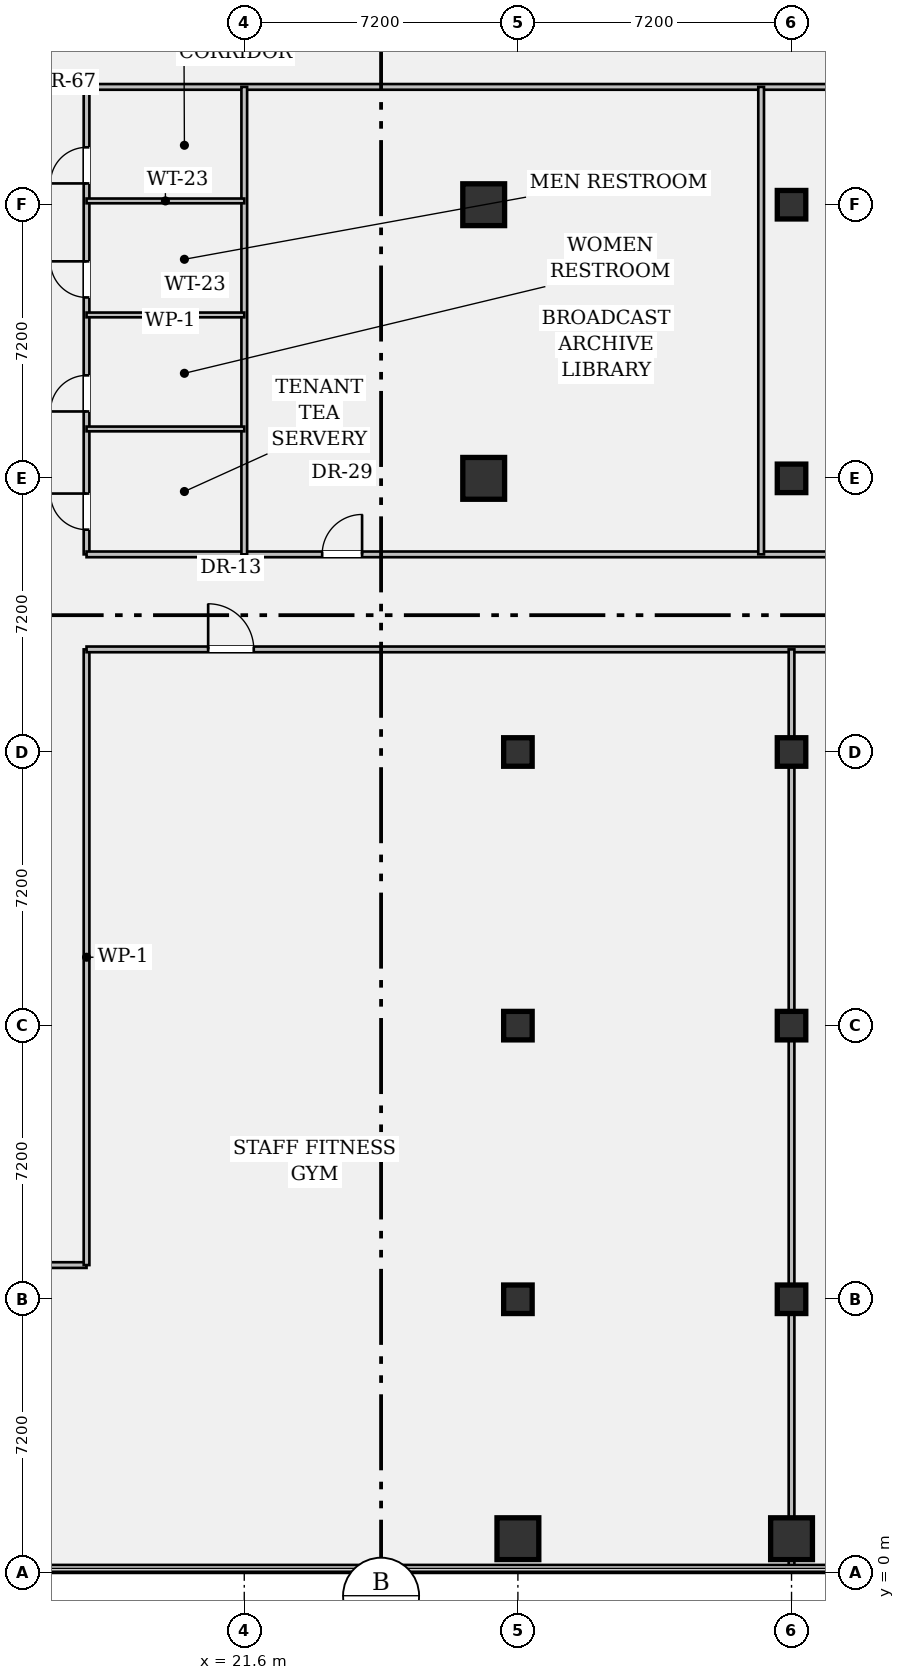
"""IFC4 building model, lengths in metres.
Left out: names, types, materials, properties, quantities, classifications, styles, units other than length and angle.
Written with IfcOpenShell. Run it as: python <this file> out.ifc"""

import sys

from ifc_helpers import new_model, si_unit, direction, frame, frame_2d, origin, origin_2d, place, context, subcontext, project, spatial, rectangle, hollow_rectangle, extrude, element, fill, save


model = new_model("IFC4")
c1 = context("Model", 3, precision=1e-05, world=origin(), true_north=direction((0.0, 1.0)))
c2 = subcontext(c1, "Body", "Model", "MODEL_VIEW")
j1 = project(units=[si_unit("LENGTHUNIT", "METRE"), si_unit("PLANEANGLEUNIT", "RADIAN")], contexts=[c1])
p1 = place(None, origin())
s1 = spatial("IfcSite", under=j1, at=p1, CompositionType="ELEMENT")
p2 = place(p1, origin())
s2 = spatial("IfcBuilding", under=s1, at=p2, CompositionType="ELEMENT")
p3 = place(p2, frame((0.0, 0.0, 22.05)))
s3 = spatial("IfcBuildingStorey", under=s2, at=p3, CompositionType="ELEMENT", Elevation=22.05)
for number, where, z_axis, x_axis in (
    (1, (27.9, 28.8, 0.0), (0.0, 0.0, 1.0), (1.0, 0.0, 0.0)),
    (2, (27.9, 36.0, 0.0), (0.0, 0.0, 1.0), (1.0, 0.0, 0.0)),
    (3, (28.8, 0.9, 0.0), (0.0, 0.0, 1.0), (1.0, 0.0, 0.0)),
):
    element("IfcColumn", number, at=place(p3, frame(where, z_axis=z_axis, x_axis=x_axis)), inside=s3, PredefinedType="COLUMN", context=c2, shape_type="SweptSolid", body=[
        extrude(hollow_rectangle(XDim=1.1, YDim=1.1, WallThickness=0.07, at=origin_2d()), origin(), (0.0, 0.0, 1.0), 3.9),
    ])
for number, where, z_axis, x_axis in (
    (4, (28.8, 7.2, 0.0), (0.0, 0.0, 1.0), (1.0, 0.0, 0.0)),
    (5, (28.8, 14.4, 0.0), (0.0, 0.0, 1.0), (1.0, 0.0, 0.0)),
    (6, (28.8, 21.6, 0.0), (0.0, 0.0, 1.0), (1.0, 0.0, 0.0)),
):
    element("IfcColumn", number, at=place(p3, frame(where, z_axis=z_axis, x_axis=x_axis)), inside=s3, PredefinedType="COLUMN", context=c2, shape_type="SweptSolid", body=[
        extrude(rectangle(XDim=0.75, YDim=0.75, at=origin_2d()), origin(), (0.0, 0.0, 1.0), 3.9),
    ])
p4 = place(p3, frame((36.0, 0.9, 0.0), z_axis=(0.0, 0.0, 1.0), x_axis=(1.0, 0.0, 0.0)))
e7 = element("IfcColumn", 7, at=p4, inside=s3, PredefinedType="COLUMN", context=c2, shape_type="SweptSolid", body=[
    extrude(hollow_rectangle(XDim=1.1, YDim=1.1, WallThickness=0.07, at=origin_2d()), origin(), (0.0, 0.0, 1.0), 3.9),
])
for number, where, z_axis, x_axis in (
    (8, (36.0, 7.2, 0.0), (0.0, 0.0, 1.0), (1.0, 0.0, 0.0)),
    (9, (36.0, 14.4, 0.0), (0.0, 0.0, 1.0), (1.0, 0.0, 0.0)),
    (10, (36.0, 21.6, 0.0), (0.0, 0.0, 1.0), (1.0, 0.0, 0.0)),
    (11, (36.0, 28.8, 0.0), (0.0, 0.0, 1.0), (1.0, 0.0, 0.0)),
    (12, (36.0, 36.0, 0.0), (0.0, 0.0, 1.0), (1.0, 0.0, 0.0)),
):
    element("IfcColumn", number, at=place(p3, frame(where, z_axis=z_axis, x_axis=x_axis)), inside=s3, PredefinedType="COLUMN", context=c2, shape_type="SweptSolid", body=[
        extrude(rectangle(XDim=0.75, YDim=0.75, at=origin_2d()), origin(), (0.0, 0.0, 1.0), 3.9),
    ])
p5 = place(p3, frame((14.4, 8.1, 0.0), z_axis=(0.0, 0.0, 1.0), x_axis=(1.0, 0.0, 0.0)))
e13 = element("IfcWall", 13, at=p5, inside=s3, PredefinedType="PARTITIONING", context=c2, shape_type="SweptSolid", body=[
    extrude(rectangle(XDim=3.05, YDim=0.15, at=frame_2d((1.525, 0.0))), origin(), (0.0, 0.0, 1.0), 2.958),
])
p6 = place(p5, frame((0.9, 0.0, 0.0)))
e14 = element("IfcOpeningElement", 14, at=p6, cuts=e13, PredefinedType="OPENING", context=c2, shape_type="SweptSolid", body=[
    extrude(rectangle(XDim=1.0, YDim=2.15, at=frame_2d((0.5, 1.075))), frame((0.0, 0.087, 0.0), z_axis=(0.0, -1.0, 0.0), x_axis=(1.0, 0.0, 0.0)), (0.0, 0.0, 1.0), 0.174),
])
p7 = place(p3, frame((17.45, 8.1, 0.0), z_axis=(0.0, 0.0, 1.0), x_axis=(0.0, 1.0, 0.0)))
e15 = element("IfcWall", 15, at=p7, inside=s3, PredefinedType="PARTITIONING", context=c2, shape_type="SweptSolid", body=[
    extrude(rectangle(XDim=16.2, YDim=0.15, at=frame_2d((8.1, 0.0))), origin(), (0.0, 0.0, 1.0), 2.958),
])
p8 = place(p3, frame((17.45, 26.8, 0.0), z_axis=(0.0, 0.0, 1.0), x_axis=(0.0, 1.0, 0.0)))
e16 = element("IfcWall", 16, at=p8, inside=s3, PredefinedType="PARTITIONING", context=c2, shape_type="SweptSolid", body=[
    extrude(rectangle(XDim=12.3, YDim=0.15, at=frame_2d((6.15, 0.0))), origin(), (0.0, 0.0, 1.0), 2.958),
])
p9 = place(p8, frame((9.76, 0.0, 0.0)))
e17 = element("IfcOpeningElement", 17, at=p9, cuts=e16, PredefinedType="OPENING", context=c2, shape_type="SweptSolid", body=[
    extrude(rectangle(XDim=0.95, YDim=2.15, at=frame_2d((0.475, 1.075))), frame((0.0, 0.087, 0.0), z_axis=(0.0, -1.0, 0.0), x_axis=(1.0, 0.0, 0.0)), (0.0, 0.0, 1.0), 0.174),
])
p10 = place(p8, frame((6.76, 0.0, 0.0)))
e18 = element("IfcOpeningElement", 18, at=p10, cuts=e16, PredefinedType="OPENING", context=c2, shape_type="SweptSolid", body=[
    extrude(rectangle(XDim=0.95, YDim=2.15, at=frame_2d((0.475, 1.075))), frame((0.0, 0.087, 0.0), z_axis=(0.0, -1.0, 0.0), x_axis=(1.0, 0.0, 0.0)), (0.0, 0.0, 1.0), 0.174),
])
p11 = place(p8, frame((3.76, 0.0, 0.0)))
e19 = element("IfcOpeningElement", 19, at=p11, cuts=e16, PredefinedType="OPENING", context=c2, shape_type="SweptSolid", body=[
    extrude(rectangle(XDim=0.95, YDim=2.15, at=frame_2d((0.475, 1.075))), frame((0.0, 0.087, 0.0), z_axis=(0.0, -1.0, 0.0), x_axis=(1.0, 0.0, 0.0)), (0.0, 0.0, 1.0), 0.174),
])
p12 = place(p8, frame((0.65, 0.0, 0.0)))
e20 = element("IfcOpeningElement", 20, at=p12, cuts=e16, PredefinedType="OPENING", context=c2, shape_type="SweptSolid", body=[
    extrude(rectangle(XDim=0.95, YDim=2.15, at=frame_2d((0.475, 1.075))), frame((0.0, 0.087, 0.0), z_axis=(0.0, -1.0, 0.0), x_axis=(1.0, 0.0, 0.0)), (0.0, 0.0, 1.0), 0.174),
])
p13 = place(p3, frame((17.45, 39.1, 0.0), z_axis=(0.0, 0.0, 1.0), x_axis=(1.0, 0.0, 0.0)))
e21 = element("IfcWall", 21, at=p13, inside=s3, PredefinedType="PARTITIONING", context=c2, shape_type="SweptSolid", body=[
    extrude(rectangle(XDim=32.83, YDim=0.15, at=frame_2d((16.415, 0.0))), origin(), (0.0, 0.0, 1.0), 2.958),
])
p14 = place(p3, frame((17.45, 24.3, 0.0), z_axis=(0.0, 0.0, 1.0), x_axis=(1.0, 0.0, 0.0)))
e22 = element("IfcWall", 22, at=p14, inside=s3, PredefinedType="PARTITIONING", context=c2, shape_type="SweptSolid", body=[
    extrude(rectangle(XDim=43.55, YDim=0.15, at=frame_2d((21.775, 0.0))), origin(), (0.0, 0.0, 1.0), 2.958),
])
p15 = place(p14, frame((3.2, 0.0, 0.0)))
e23 = element("IfcOpeningElement", 23, at=p15, cuts=e22, PredefinedType="OPENING", context=c2, shape_type="SweptSolid", body=[
    extrude(rectangle(XDim=1.2, YDim=2.15, at=frame_2d((0.6, 1.075))), frame((0.0, 0.087, 0.0), z_axis=(0.0, -1.0, 0.0), x_axis=(1.0, 0.0, 0.0)), (0.0, 0.0, 1.0), 0.174),
])
p16 = place(p14, frame((20.95, 0.0, 0.0)))
e24 = element("IfcOpeningElement", 24, at=p16, cuts=e22, PredefinedType="OPENING", context=c2, shape_type="SweptSolid", body=[
    extrude(rectangle(XDim=1.2, YDim=2.15, at=frame_2d((0.6, 1.075))), frame((0.0, 0.087, 0.0), z_axis=(0.0, -1.0, 0.0), x_axis=(1.0, 0.0, 0.0)), (0.0, 0.0, 1.0), 0.174),
])
p17 = place(p14, frame((30.55, 0.0, 0.0)))
e25 = element("IfcOpeningElement", 25, at=p17, cuts=e22, PredefinedType="OPENING", context=c2, shape_type="SweptSolid", body=[
    extrude(rectangle(XDim=1.05, YDim=2.15, at=frame_2d((0.525, 1.075))), frame((0.0, 0.087, 0.0), z_axis=(0.0, -1.0, 0.0), x_axis=(1.0, 0.0, 0.0)), (0.0, 0.0, 1.0), 0.174),
])
p18 = place(p3, frame((17.45, 26.8, 0.0), z_axis=(0.0, 0.0, 1.0), x_axis=(1.0, 0.0, 0.0)))
e26 = element("IfcWall", 26, at=p18, inside=s3, PredefinedType="PARTITIONING", context=c2, shape_type="SweptSolid", body=[
    extrude(rectangle(XDim=68.83, YDim=0.15, at=frame_2d((34.415, 0.0))), origin(), (0.0, 0.0, 1.0), 2.958),
])
p19 = place(p18, frame((6.2, 0.0, 0.0)))
e27 = element("IfcOpeningElement", 27, at=p19, cuts=e26, PredefinedType="OPENING", context=c2, shape_type="SweptSolid", body=[
    extrude(rectangle(XDim=1.05, YDim=2.15, at=frame_2d((0.525, 1.075))), frame((0.0, 0.087, 0.0), z_axis=(0.0, -1.0, 0.0), x_axis=(1.0, 0.0, 0.0)), (0.0, 0.0, 1.0), 0.174),
])
p20 = place(p18, frame((20.4, 0.0, 0.0)))
e28 = element("IfcOpeningElement", 28, at=p20, cuts=e26, PredefinedType="OPENING", context=c2, shape_type="SweptSolid", body=[
    extrude(rectangle(XDim=1.05, YDim=2.15, at=frame_2d((0.525, 1.075))), frame((0.0, 0.087, 0.0), z_axis=(0.0, -1.0, 0.0), x_axis=(1.0, 0.0, 0.0)), (0.0, 0.0, 1.0), 0.174),
])
p21 = place(p3, frame((21.6, 26.8, 0.0), z_axis=(0.0, 0.0, 1.0), x_axis=(0.0, 1.0, 0.0)))
e29 = element("IfcWall", 29, at=p21, inside=s3, PredefinedType="PARTITIONING", context=c2, shape_type="SweptSolid", body=[
    extrude(rectangle(XDim=12.3, YDim=0.15, at=frame_2d((6.15, 0.0))), origin(), (0.0, 0.0, 1.0), 2.958),
])
p22 = place(p3, frame((17.45, 36.1, 0.0), z_axis=(0.0, 0.0, 1.0), x_axis=(1.0, 0.0, 0.0)))
e30 = element("IfcWall", 30, at=p22, inside=s3, PredefinedType="PARTITIONING", context=c2, shape_type="SweptSolid", body=[
    extrude(rectangle(XDim=4.15, YDim=0.125, at=frame_2d((2.075, 0.0))), origin(), (0.0, 0.0, 1.0), 2.958),
])
for number, where, z_axis, x_axis in (
    (31, (17.45, 33.1, 0.0), (0.0, 0.0, 1.0), (1.0, 0.0, 0.0)),
    (32, (17.45, 30.1, 0.0), (0.0, 0.0, 1.0), (1.0, 0.0, 0.0)),
):
    element("IfcWall", number, at=place(p3, frame(where, z_axis=z_axis, x_axis=x_axis)), inside=s3, PredefinedType="PARTITIONING", context=c2, shape_type="SweptSolid", body=[
        extrude(rectangle(XDim=4.15, YDim=0.125, at=frame_2d((2.075, 0.0))), origin(), (0.0, 0.0, 1.0), 3.418),
    ])
p23 = place(p3, frame((36.0, 0.12, 0.0), z_axis=(0.0, 0.0, 1.0), x_axis=(0.0, 1.0, 0.0)))
e33 = element("IfcWall", 33, at=p23, inside=s3, PredefinedType="PARTITIONING", context=c2, shape_type="SweptSolid", body=[
    extrude(rectangle(XDim=24.18, YDim=0.15, at=frame_2d((12.09, 0.0))), origin(), (0.0, 0.0, 1.0), 2.958),
])
p24 = place(p3, frame((35.2, 26.8, 0.0), z_axis=(0.0, 0.0, 1.0), x_axis=(0.0, 1.0, 0.0)))
e34 = element("IfcWall", 34, at=p24, inside=s3, PredefinedType="PARTITIONING", context=c2, shape_type="SweptSolid", body=[
    extrude(rectangle(XDim=12.3, YDim=0.15, at=frame_2d((6.15, 0.0))), origin(), (0.0, 0.0, 1.0), 2.958),
])
p25 = place(p9, origin())
e35 = element("IfcDoor", 35, at=p25, inside=s3, OperationType="SINGLE_SWING_LEFT", PredefinedType="DOOR", context=c2, shape_type="SweptSolid", body=[
    extrude(rectangle(XDim=0.95, YDim=2.15, at=frame_2d((0.475, 1.075))), frame((0.0, 0.025, 0.0), z_axis=(0.0, -1.0, 0.0), x_axis=(1.0, 0.0, 0.0)), (0.0, 0.0, 1.0), 0.05),
])
fill(e17, e35)
p26 = place(p10, origin())
e36 = element("IfcDoor", 36, at=p26, inside=s3, OperationType="SINGLE_SWING_RIGHT", PredefinedType="DOOR", context=c2, shape_type="SweptSolid", body=[
    extrude(rectangle(XDim=0.95, YDim=2.15, at=frame_2d((0.475, 1.075))), frame((0.0, 0.025, 0.0), z_axis=(0.0, -1.0, 0.0), x_axis=(1.0, 0.0, 0.0)), (0.0, 0.0, 1.0), 0.05),
])
fill(e18, e36)
p27 = place(p11, origin())
e37 = element("IfcDoor", 37, at=p27, inside=s3, OperationType="SINGLE_SWING_LEFT", PredefinedType="DOOR", context=c2, shape_type="SweptSolid", body=[
    extrude(rectangle(XDim=0.95, YDim=2.15, at=frame_2d((0.475, 1.075))), frame((0.0, 0.025, 0.0), z_axis=(0.0, -1.0, 0.0), x_axis=(1.0, 0.0, 0.0)), (0.0, 0.0, 1.0), 0.05),
])
fill(e19, e37)
p28 = place(p12, origin())
e38 = element("IfcDoor", 38, at=p28, inside=s3, OperationType="SINGLE_SWING_RIGHT", PredefinedType="DOOR", context=c2, shape_type="SweptSolid", body=[
    extrude(rectangle(XDim=0.95, YDim=2.15, at=frame_2d((0.475, 1.075))), frame((0.0, 0.025, 0.0), z_axis=(0.0, -1.0, 0.0), x_axis=(1.0, 0.0, 0.0)), (0.0, 0.0, 1.0), 0.05),
])
fill(e20, e38)
p29 = place(p15, origin())
e39 = element("IfcDoor", 39, at=p29, inside=s3, OperationType="SINGLE_SWING_LEFT", PredefinedType="DOOR", context=c2, shape_type="SweptSolid", body=[
    extrude(rectangle(XDim=1.2, YDim=2.15, at=frame_2d((0.6, 1.075))), frame((0.0, 0.025, 0.0), z_axis=(0.0, -1.0, 0.0), x_axis=(1.0, 0.0, 0.0)), (0.0, 0.0, 1.0), 0.05),
])
fill(e23, e39)
p30 = place(p19, origin())
e40 = element("IfcDoor", 40, at=p30, inside=s3, OperationType="SINGLE_SWING_RIGHT", PredefinedType="DOOR", context=c2, shape_type="SweptSolid", body=[
    extrude(rectangle(XDim=1.05, YDim=2.15, at=frame_2d((0.525, 1.075))), frame((0.0, 0.025, 0.0), z_axis=(0.0, -1.0, 0.0), x_axis=(1.0, 0.0, 0.0)), (0.0, 0.0, 1.0), 0.05),
])
fill(e27, e40)
save(model, sys.argv[1])
